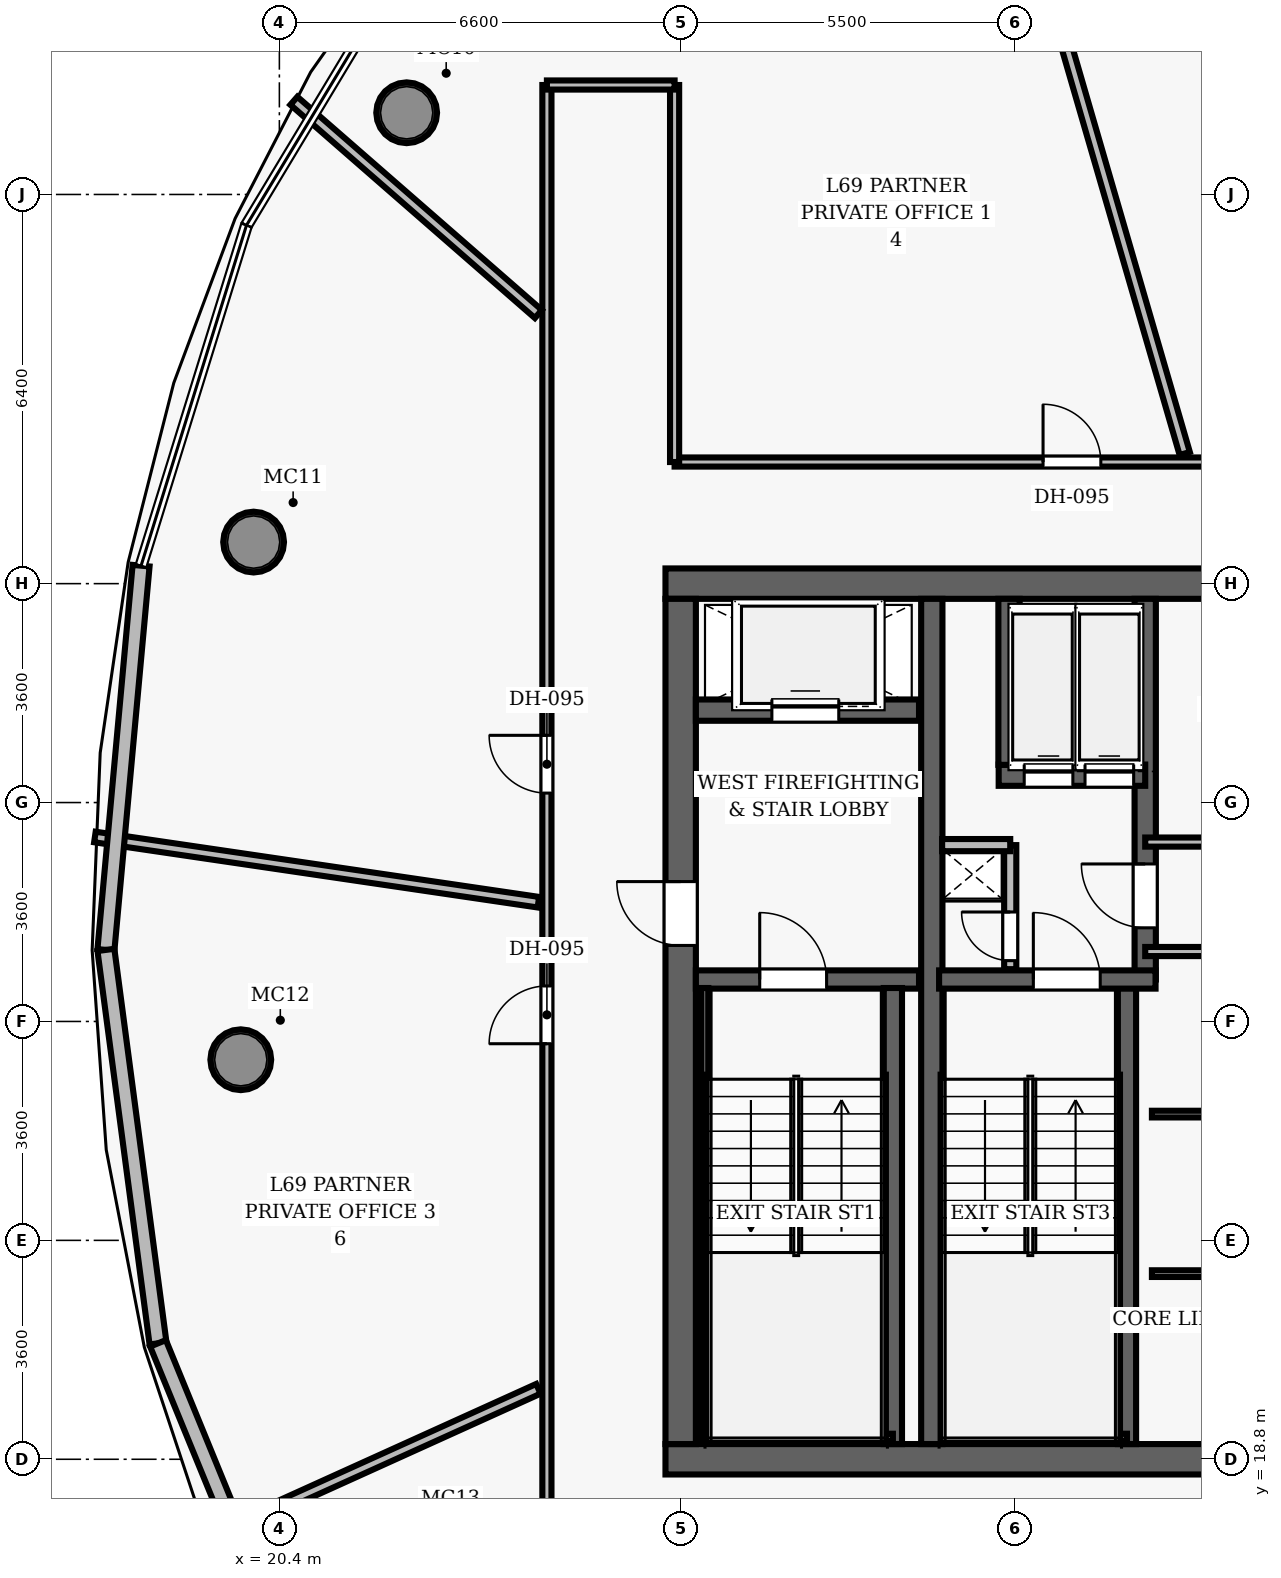
"""IFC4 building model, lengths in metres.
Left out: names, types, materials, properties, quantities, classifications, styles, units other than length and angle.
Written with IfcOpenShell. Run it as: python <this file> out.ifc"""

import sys

from ifc_helpers import new_model, si_unit, direction, frame, frame_2d, origin, origin_2d, place, context, subcontext, project, spatial, rectangle, hollow_circle, extrude, element, fill, save


model = new_model("IFC4")
c1 = context("Model", 3, precision=1e-05, world=origin(), true_north=direction((0.0, 1.0)))
c2 = subcontext(c1, "Body", "Model", "MODEL_VIEW")
j1 = project(units=[si_unit("LENGTHUNIT", "METRE"), si_unit("PLANEANGLEUNIT", "RADIAN")], contexts=[c1])
p1 = place(None, origin())
s1 = spatial("IfcSite", under=j1, at=p1, CompositionType="ELEMENT")
p2 = place(p1, origin())
s2 = spatial("IfcBuilding", under=s1, at=p2, CompositionType="ELEMENT")
p3 = place(p2, frame((0.0, 0.0, 272.85)))
s3 = spatial("IfcBuildingStorey", under=s2, at=p3, CompositionType="ELEMENT", Elevation=272.85)
p4 = place(p3, frame((26.75, 18.8, 0.0), z_axis=(0.0, 0.0, 1.0), x_axis=(1.0, 0.0, 0.0)))
e1 = element("IfcWall", 1, at=p4, inside=s3, PredefinedType="SHEAR", context=c2, shape_type="SweptSolid", body=[
    extrude(rectangle(XDim=22.5, YDim=0.5, at=frame_2d((11.25, 0.0))), origin(), (0.0, 0.0, 1.0), 3.85),
])
p5 = place(p4, frame((14.47, 0.0, 0.0)))
e2 = element("IfcOpeningElement", 2, at=p5, cuts=e1, PredefinedType="OPENING", context=c2, shape_type="SweptSolid", body=[
    extrude(rectangle(XDim=1.05, YDim=2.15, at=frame_2d((0.525, 1.075))), frame((0.0, 0.26, 0.0), z_axis=(0.0, -1.0, 0.0), x_axis=(1.0, 0.0, 0.0)), (0.0, 0.0, 1.0), 0.52),
])
p6 = place(p3, frame((26.75, 33.2, 0.0), z_axis=(0.0, 0.0, 1.0), x_axis=(1.0, 0.0, 0.0)))
e3 = element("IfcWall", 3, at=p6, inside=s3, PredefinedType="SHEAR", context=c2, shape_type="SweptSolid", body=[
    extrude(rectangle(XDim=22.5, YDim=0.5, at=frame_2d((11.25, 0.0))), origin(), (0.0, 0.0, 1.0), 3.85),
])
p7 = place(p3, frame((27.0, 19.05, 0.0), z_axis=(0.0, 0.0, 1.0), x_axis=(0.0, 1.0, 0.0)))
e4 = element("IfcWall", 4, at=p7, inside=s3, PredefinedType="SHEAR", context=c2, shape_type="SweptSolid", body=[
    extrude(rectangle(XDim=13.9, YDim=0.5, at=frame_2d((6.95, 0.0))), origin(), (0.0, 0.0, 1.0), 3.85),
])
p8 = place(p7, frame((8.2, 0.0, 0.0)))
e5 = element("IfcOpeningElement", 5, at=p8, cuts=e4, PredefinedType="OPENING", context=c2, shape_type="SweptSolid", body=[
    extrude(rectangle(XDim=1.05, YDim=2.15, at=frame_2d((0.525, 1.075))), frame((0.0, 0.26, 0.0), z_axis=(0.0, -1.0, 0.0), x_axis=(1.0, 0.0, 0.0)), (0.0, 0.0, 1.0), 0.52),
])
p9 = place(p3, frame((31.13, 19.05, 0.0), z_axis=(0.0, 0.0, 1.0), x_axis=(0.0, 1.0, 0.0)))
e6 = element("IfcWall", 6, at=p9, inside=s3, PredefinedType="SHEAR", context=c2, shape_type="SweptSolid", body=[
    extrude(rectangle(XDim=13.9, YDim=0.35, at=frame_2d((6.95, 0.0))), origin(), (0.0, 0.0, 1.0), 3.85),
])
for number, where, z_axis, x_axis in (
    (7, (22.494, 40.944, 0.0), (0.0, 0.0, 1.0), (1.0, 0.0, 0.0)),
    (8, (19.976, 33.884, 0.0), (0.0, 0.0, 1.0), (1.0, 0.0, 0.0)),
    (9, (19.765, 25.371, 0.0), (0.0, 0.0, 1.0), (1.0, 0.0, 0.0)),
):
    element("IfcColumn", number, at=place(p3, frame(where, z_axis=z_axis, x_axis=x_axis)), inside=s3, PredefinedType="COLUMN", context=c2, shape_type="SweptSolid", body=[
        extrude(hollow_circle(Radius=0.5, WallThickness=0.045, at=origin_2d()), origin(), (0.0, 0.0, 1.0), 3.85),
    ])
p10 = place(p3, frame((27.25, 26.69, 0.0), z_axis=(0.0, 0.0, 1.0), x_axis=(1.0, 0.0, 0.0)))
e10 = element("IfcWall", 10, at=p10, inside=s3, PredefinedType="SHEAR", context=c2, shape_type="SweptSolid", body=[
    extrude(rectangle(XDim=3.67, YDim=0.3, at=frame_2d((1.835, 0.0))), origin(), (0.0, 0.0, 1.0), 3.85),
])
p11 = place(p10, frame((1.05, 0.0, 0.0)))
e11 = element("IfcOpeningElement", 11, at=p11, cuts=e10, PredefinedType="OPENING", context=c2, shape_type="SweptSolid", body=[
    extrude(rectangle(XDim=1.1, YDim=2.15, at=frame_2d((0.55, 1.075))), frame((0.0, 0.16, 0.0), z_axis=(0.0, -1.0, 0.0), x_axis=(1.0, 0.0, 0.0)), (0.0, 0.0, 1.0), 0.32),
])
p12 = place(p3, frame((30.49, 19.05, 0.0), z_axis=(0.0, 0.0, 1.0), x_axis=(0.0, 1.0, 0.0)))
e12 = element("IfcWall", 12, at=p12, inside=s3, PredefinedType="SHEAR", context=c2, shape_type="SweptSolid", body=[
    extrude(rectangle(XDim=7.5, YDim=0.3, at=frame_2d((3.75, 0.0))), origin(), (0.0, 0.0, 1.0), 3.85),
])
p13 = place(p3, frame((27.395, 19.1, 0.0), z_axis=(0.0, 0.0, 1.0), x_axis=(0.0, 1.0, 0.0)))
e13 = element("IfcWall", 13, at=p13, inside=s3, PredefinedType="SHEAR", context=c2, shape_type="SweptSolid", body=[
    extrude(rectangle(XDim=7.45, YDim=0.12, at=frame_2d((3.725, 0.0))), origin(), (0.0, 0.0, 1.0), 3.85),
])
p14 = place(p3, frame((27.395, 19.16, 0.0), z_axis=(0.0, 0.0, 1.0), x_axis=(1.0, 0.0, 0.0)))
e14 = element("IfcWall", 14, at=p14, inside=s3, PredefinedType="SHEAR", context=c2, shape_type="SweptSolid", body=[
    extrude(rectangle(XDim=3.095, YDim=0.12, at=frame_2d((1.547, 0.0))), origin(), (0.0, 0.0, 1.0), 3.85),
])
p15 = place(p3, frame((27.25, 31.12, 0.0), z_axis=(0.0, 0.0, 1.0), x_axis=(1.0, 0.0, 0.0)))
e15 = element("IfcWall", 15, at=p15, inside=s3, PredefinedType="SHEAR", context=c2, shape_type="SweptSolid", body=[
    extrude(rectangle(XDim=3.67, YDim=0.35, at=frame_2d((1.835, 0.0))), origin(), (0.0, 0.0, 1.0), 3.04),
])
p16 = place(p15, frame((1.25, 0.0, 0.0)))
e16 = element("IfcOpeningElement", 16, at=p16, cuts=e15, PredefinedType="OPENING", context=c2, shape_type="SweptSolid", body=[
    extrude(rectangle(XDim=1.1, YDim=2.15, at=frame_2d((0.55, 1.075))), frame((0.0, 0.185, 0.0), z_axis=(0.0, -1.0, 0.0), x_axis=(1.0, 0.0, 0.0)), (0.0, 0.0, 1.0), 0.37),
])
p17 = place(p3, frame((34.34, 19.05, 0.0), z_axis=(0.0, 0.0, 1.0), x_axis=(0.0, 1.0, 0.0)))
e17 = element("IfcWall", 17, at=p17, inside=s3, PredefinedType="SHEAR", context=c2, shape_type="SweptSolid", body=[
    extrude(rectangle(XDim=7.5, YDim=0.3, at=frame_2d((3.75, 0.0))), origin(), (0.0, 0.0, 1.0), 3.85),
])
p18 = place(p3, frame((34.64, 26.69, 0.0), z_axis=(0.0, 0.0, 1.0), x_axis=(0.0, 1.0, 0.0)))
e18 = element("IfcWall", 18, at=p18, inside=s3, PredefinedType="SHEAR", context=c2, shape_type="SweptSolid", body=[
    extrude(rectangle(XDim=6.26, YDim=0.35, at=frame_2d((3.13, 0.0))), origin(), (0.0, 0.0, 1.0), 3.85),
])
p19 = place(p18, frame((0.85, 0.0, 0.0)))
e19 = element("IfcOpeningElement", 19, at=p19, cuts=e18, PredefinedType="OPENING", context=c2, shape_type="SweptSolid", body=[
    extrude(rectangle(XDim=1.05, YDim=2.15, at=frame_2d((0.525, 1.075))), frame((0.0, 0.185, 0.0), z_axis=(0.0, -1.0, 0.0), x_axis=(1.0, 0.0, 0.0)), (0.0, 0.0, 1.0), 0.37),
])
p20 = place(p3, frame((31.25, 26.69, 0.0), z_axis=(0.0, 0.0, 1.0), x_axis=(1.0, 0.0, 0.0)))
e20 = element("IfcWall", 20, at=p20, inside=s3, PredefinedType="SHEAR", context=c2, shape_type="SweptSolid", body=[
    extrude(rectangle(XDim=3.56, YDim=0.3, at=frame_2d((1.78, 0.0))), origin(), (0.0, 0.0, 1.0), 3.85),
])
p21 = place(p20, frame((1.55, 0.0, 0.0)))
e21 = element("IfcOpeningElement", 21, at=p21, cuts=e20, PredefinedType="OPENING", context=c2, shape_type="SweptSolid", body=[
    extrude(rectangle(XDim=1.1, YDim=2.15, at=frame_2d((0.55, 1.075))), frame((0.0, 0.16, 0.0), z_axis=(0.0, -1.0, 0.0), x_axis=(1.0, 0.0, 0.0)), (0.0, 0.0, 1.0), 0.32),
])
p22 = place(p3, frame((31.3, 19.16, 0.0), z_axis=(0.0, 0.0, 1.0), x_axis=(1.0, 0.0, 0.0)))
e22 = element("IfcWall", 22, at=p22, inside=s3, PredefinedType="SHEAR", context=c2, shape_type="SweptSolid", body=[
    extrude(rectangle(XDim=3.04, YDim=0.12, at=frame_2d((1.52, 0.0))), origin(), (0.0, 0.0, 1.0), 3.85),
])
p23 = place(p3, frame((32.23, 30.05, 0.0), z_axis=(0.0, 0.0, 1.0), x_axis=(1.0, 0.0, 0.0)))
e23 = element("IfcWall", 23, at=p23, inside=s3, PredefinedType="SHEAR", context=c2, shape_type="SweptSolid", body=[
    extrude(rectangle(XDim=2.41, YDim=0.35, at=frame_2d((1.205, 0.0))), origin(), (0.0, 0.0, 1.0), 3.04),
])
p24 = place(p23, frame((0.42, 0.0, 0.0)))
e24 = element("IfcOpeningElement", 24, at=p24, cuts=e23, PredefinedType="OPENING", context=c2, shape_type="SweptSolid", body=[
    extrude(rectangle(XDim=0.8, YDim=2.15, at=frame_2d((0.4, 1.075))), frame((0.0, 0.185, 0.0), z_axis=(0.0, -1.0, 0.0), x_axis=(1.0, 0.0, 0.0)), (0.0, 0.0, 1.0), 0.37),
])
p25 = place(p23, frame((1.42, 0.0, 0.0)))
e25 = element("IfcOpeningElement", 25, at=p25, cuts=e23, PredefinedType="OPENING", context=c2, shape_type="SweptSolid", body=[
    extrude(rectangle(XDim=0.8, YDim=2.15, at=frame_2d((0.4, 1.075))), frame((0.0, 0.185, 0.0), z_axis=(0.0, -1.0, 0.0), x_axis=(1.0, 0.0, 0.0)), (0.0, 0.0, 1.0), 0.37),
])
p26 = place(p3, frame((32.4, 30.22, 0.0), z_axis=(0.0, 0.0, 1.0), x_axis=(0.0, 1.0, 0.0)))
e26 = element("IfcWall", 26, at=p26, inside=s3, PredefinedType="SHEAR", context=c2, shape_type="SweptSolid", body=[
    extrude(rectangle(XDim=2.73, YDim=0.35, at=frame_2d((1.365, 0.0))), origin(), (0.0, 0.0, 1.0), 3.04),
])
p27 = place(p3, frame((32.42, 26.86, 0.0), z_axis=(0.0, 0.0, 1.0), x_axis=(0.0, 1.0, 0.0)))
e27 = element("IfcWall", 27, at=p27, inside=s3, PredefinedType="PARTITIONING", context=c2, shape_type="SweptSolid", body=[
    extrude(rectangle(XDim=2.04, YDim=0.2, at=frame_2d((1.02, 0.0))), origin(), (0.0, 0.0, 1.0), 3.04),
])
p28 = place(p27, frame((0.14, 0.0, 0.0)))
e28 = element("IfcOpeningElement", 28, at=p28, cuts=e27, PredefinedType="OPENING", context=c2, shape_type="SweptSolid", body=[
    extrude(rectangle(XDim=0.8, YDim=2.05, at=frame_2d((0.4, 1.025))), frame((0.0, 0.11, 0.0), z_axis=(0.0, -1.0, 0.0), x_axis=(1.0, 0.0, 0.0)), (0.0, 0.0, 1.0), 0.22),
])
p29 = place(p3, frame((31.3, 28.9, 0.0), z_axis=(0.0, 0.0, 1.0), x_axis=(1.0, 0.0, 0.0)))
e29 = element("IfcWall", 29, at=p29, inside=s3, PredefinedType="PARTITIONING", context=c2, shape_type="SweptSolid", body=[
    extrude(rectangle(XDim=1.12, YDim=0.2, at=frame_2d((0.56, 0.0))), origin(), (0.0, 0.0, 1.0), 3.04),
])
for number, where, z_axis, x_axis in (
    (30, (34.64, 27.15, 0.0), (0.0, 0.0, 1.0), (1.0, 0.0, 0.0)),
    (31, (34.64, 28.95, 0.0), (0.0, 0.0, 1.0), (1.0, 0.0, 0.0)),
):
    element("IfcWall", number, at=place(p3, frame(where, z_axis=z_axis, x_axis=x_axis)), inside=s3, PredefinedType="PARTITIONING", context=c2, shape_type="SweptSolid", body=[
        extrude(rectangle(XDim=6.36, YDim=0.15, at=frame_2d((3.18, 0.0))), origin(), (0.0, 0.0, 1.0), 3.04),
    ])
for number, where, z_axis, x_axis in (
    (32, (34.75, 21.853, 0.0), (0.0, 0.0, 1.0), (1.0, 0.0, 0.0)),
    (33, (34.75, 24.477, 0.0), (0.0, 0.0, 1.0), (1.0, 0.0, 0.0)),
):
    element("IfcWall", number, at=place(p3, frame(where, z_axis=z_axis, x_axis=x_axis)), inside=s3, PredefinedType="PARTITIONING", context=c2, shape_type="SweptSolid", body=[
        extrude(rectangle(XDim=6.25, YDim=0.11, at=frame_2d((3.125, 0.0))), origin(), (0.0, 0.0, 1.0), 3.04),
    ])
p30 = place(p3, frame((26.9, 35.2, 0.0), z_axis=(0.0, 0.0, 1.0), x_axis=(1.0, 0.0, 0.0)))
e34 = element("IfcWall", 34, at=p30, inside=s3, PredefinedType="PARTITIONING", context=c2, shape_type="SweptSolid", body=[
    extrude(rectangle(XDim=10.05, YDim=0.15, at=frame_2d((5.025, 0.0))), origin(), (0.0, 0.0, 1.0), 3.04),
])
p31 = place(p30, frame((6.06, 0.0, 0.0)))
e35 = element("IfcOpeningElement", 35, at=p31, cuts=e34, PredefinedType="OPENING", context=c2, shape_type="SweptSolid", body=[
    extrude(rectangle(XDim=0.95, YDim=2.15, at=frame_2d((0.475, 1.075))), frame((0.0, 0.085, 0.0), z_axis=(0.0, -1.0, 0.0), x_axis=(1.0, 0.0, 0.0)), (0.0, 0.0, 1.0), 0.17),
])
p32 = place(p3, frame((24.8, 10.6, 0.0), z_axis=(0.0, 0.0, 1.0), x_axis=(0.0, 1.0, 0.0)))
e36 = element("IfcWall", 36, at=p32, inside=s3, PredefinedType="PARTITIONING", context=c2, shape_type="SweptSolid", body=[
    extrude(rectangle(XDim=30.8, YDim=0.15, at=frame_2d((15.4, 0.0))), origin(), (0.0, 0.0, 1.0), 3.04),
])
p33 = place(p32, frame((19.156, 0.0, 0.0)))
e37 = element("IfcOpeningElement", 37, at=p33, cuts=e36, PredefinedType="OPENING", context=c2, shape_type="SweptSolid", body=[
    extrude(rectangle(XDim=0.95, YDim=2.15, at=frame_2d((0.475, 1.075))), frame((0.0, 0.085, 0.0), z_axis=(0.0, -1.0, 0.0), x_axis=(1.0, 0.0, 0.0)), (0.0, 0.0, 1.0), 0.17),
])
p34 = place(p32, frame((15.034, 0.0, 0.0)))
e38 = element("IfcOpeningElement", 38, at=p34, cuts=e36, PredefinedType="OPENING", context=c2, shape_type="SweptSolid", body=[
    extrude(rectangle(XDim=0.95, YDim=2.15, at=frame_2d((0.475, 1.075))), frame((0.0, 0.085, 0.0), z_axis=(0.0, -1.0, 0.0), x_axis=(1.0, 0.0, 0.0)), (0.0, 0.0, 1.0), 0.17),
])
p35 = place(p32, frame((1.941, 0.0, 0.0)))
e39 = element("IfcOpeningElement", 39, at=p35, cuts=e36, PredefinedType="OPENING", context=c2, shape_type="SweptSolid", body=[
    extrude(rectangle(XDim=0.95, YDim=2.15, at=frame_2d((0.475, 1.075))), frame((0.0, 0.085, 0.0), z_axis=(0.0, -1.0, 0.0), x_axis=(1.0, 0.0, 0.0)), (0.0, 0.0, 1.0), 0.17),
])
p36 = place(p3, frame((26.9, 35.2, 0.0), z_axis=(0.0, 0.0, 1.0), x_axis=(0.0, 1.0, 0.0)))
e40 = element("IfcWall", 40, at=p36, inside=s3, PredefinedType="PARTITIONING", context=c2, shape_type="SweptSolid", body=[
    extrude(rectangle(XDim=6.2, YDim=0.15, at=frame_2d((3.1, 0.0))), origin(), (0.0, 0.0, 1.0), 3.04),
])
p37 = place(p3, frame((24.8, 41.4, 0.0), z_axis=(0.0, 0.0, 1.0), x_axis=(1.0, 0.0, 0.0)))
e41 = element("IfcWall", 41, at=p37, inside=s3, PredefinedType="PARTITIONING", context=c2, shape_type="SweptSolid", body=[
    extrude(rectangle(XDim=2.1, YDim=0.15, at=frame_2d((1.05, 0.0))), origin(), (0.0, 0.0, 1.0), 3.04),
])
p38 = place(p3, frame((35.29, 35.34, 0.0), z_axis=(0.0, 0.0, 1.0), x_axis=(-0.278700213972, 0.960378149862, 0.0)))
e42 = element("IfcWall", 42, at=p38, inside=s3, PredefinedType="PARTITIONING", context=c2, shape_type="SweptSolid", body=[
    extrude(rectangle(XDim=13.671, YDim=0.175, at=frame_2d((6.835, 0.0))), origin(), (0.0, 0.0, 1.0), 3.04),
])
p39 = place(p3, frame((24.66, 37.634, 0.0), z_axis=(0.0, 0.0, 1.0), x_axis=(-0.753664051115, 0.657259840594, 0.0)))
e43 = element("IfcWall", 43, at=p39, inside=s3, PredefinedType="PARTITIONING", context=c2, shape_type="SweptSolid", body=[
    extrude(rectangle(XDim=5.336, YDim=0.175, at=frame_2d((2.668, 0.0))), origin(), (0.0, 0.0, 1.0), 3.04),
])
p40 = place(p3, frame((24.66, 27.961, 0.0), z_axis=(0.0, 0.0, 1.0), x_axis=(-0.989360957967, 0.145481596263, 0.0)))
e44 = element("IfcWall", 44, at=p40, inside=s3, PredefinedType="PARTITIONING", context=c2, shape_type="SweptSolid", body=[
    extrude(rectangle(XDim=7.372, YDim=0.175, at=frame_2d((3.686, 0.0))), origin(), (0.0, 0.0, 1.0), 3.04),
])
p41 = place(p3, frame((24.66, 19.959, 0.0), z_axis=(0.0, 0.0, 1.0), x_axis=(-0.910936871774, -0.412545773997, 0.0)))
e45 = element("IfcWall", 45, at=p41, inside=s3, PredefinedType="PARTITIONING", context=c2, shape_type="SweptSolid", body=[
    extrude(rectangle(XDim=6.001, YDim=0.175, at=frame_2d((3.0, 0.0))), origin(), (0.0, 0.0, 1.0), 3.04),
])
p42 = place(p3, frame((17.547, 27.177, 0.0), z_axis=(0.0, 0.0, 1.0), x_axis=(0.091149768789, 0.995837195354, 0.0)))
e46 = element("IfcWall", 46, at=p42, inside=s3, PredefinedType="SOLIDWALL", context=c2, shape_type="SweptSolid", body=[
    extrude(rectangle(XDim=6.345, YDim=0.28, at=frame_2d((3.173, 0.0))), origin(), (0.0, 0.0, 1.0), 3.625),
])
p43 = place(p3, frame((18.404, 20.707, 0.0), z_axis=(0.0, 0.0, 1.0), x_axis=(-0.131269273367, 0.991346749563, 0.0)))
e47 = element("IfcWall", 47, at=p43, inside=s3, PredefinedType="SOLIDWALL", context=c2, shape_type="SweptSolid", body=[
    extrude(rectangle(XDim=6.526, YDim=0.28, at=frame_2d((3.263, 0.0))), origin(), (0.0, 0.0, 1.0), 3.625),
])
p44 = place(p3, frame((20.877, 14.667, 0.0), z_axis=(0.0, 0.0, 1.0), x_axis=(-0.378956165917, 0.925414622919, 0.0)))
e48 = element("IfcWall", 48, at=p44, inside=s3, PredefinedType="SOLIDWALL", context=c2, shape_type="SweptSolid", body=[
    extrude(rectangle(XDim=6.527, YDim=0.28, at=frame_2d((3.263, 0.0))), origin(), (0.0, 0.0, 1.0), 3.625),
])
p45 = place(p11, origin())
e49 = element("IfcDoor", 49, at=p45, inside=s3, OperationType="SINGLE_SWING_LEFT", PredefinedType="DOOR", context=c2, shape_type="SweptSolid", body=[
    extrude(rectangle(XDim=1.1, YDim=2.15, at=frame_2d((0.55, 1.075))), frame((0.0, 0.025, 0.0), z_axis=(0.0, -1.0, 0.0), x_axis=(1.0, 0.0, 0.0)), (0.0, 0.0, 1.0), 0.05),
])
fill(e11, e49)
p46 = place(p8, origin())
e50 = element("IfcDoor", 50, at=p46, inside=s3, OperationType="SINGLE_SWING_RIGHT", PredefinedType="DOOR", context=c2, shape_type="SweptSolid", body=[
    extrude(rectangle(XDim=1.05, YDim=2.15, at=frame_2d((0.525, 1.075))), frame((0.0, 0.025, 0.0), z_axis=(0.0, -1.0, 0.0), x_axis=(1.0, 0.0, 0.0)), (0.0, 0.0, 1.0), 0.05),
])
fill(e5, e50)
p47 = place(p21, origin())
e51 = element("IfcDoor", 51, at=p47, inside=s3, OperationType="SINGLE_SWING_LEFT", PredefinedType="DOOR", context=c2, shape_type="SweptSolid", body=[
    extrude(rectangle(XDim=1.1, YDim=2.15, at=frame_2d((0.55, 1.075))), frame((0.0, 0.025, 0.0), z_axis=(0.0, -1.0, 0.0), x_axis=(1.0, 0.0, 0.0)), (0.0, 0.0, 1.0), 0.05),
])
fill(e21, e51)
p48 = place(p28, origin())
e52 = element("IfcDoor", 52, at=p48, inside=s3, OperationType="SINGLE_SWING_RIGHT", PredefinedType="DOOR", context=c2, shape_type="SweptSolid", body=[
    extrude(rectangle(XDim=0.8, YDim=2.05, at=frame_2d((0.4, 1.025))), frame((0.0, 0.025, 0.0), z_axis=(0.0, -1.0, 0.0), x_axis=(1.0, 0.0, 0.0)), (0.0, 0.0, 1.0), 0.05),
])
fill(e28, e52)
p49 = place(p19, origin())
e53 = element("IfcDoor", 53, at=p49, inside=s3, OperationType="SINGLE_SWING_RIGHT", PredefinedType="DOOR", context=c2, shape_type="SweptSolid", body=[
    extrude(rectangle(XDim=1.05, YDim=2.15, at=frame_2d((0.525, 1.075))), frame((0.0, 0.025, 0.0), z_axis=(0.0, -1.0, 0.0), x_axis=(1.0, 0.0, 0.0)), (0.0, 0.0, 1.0), 0.05),
])
fill(e19, e53)
p50 = place(p31, origin())
e54 = element("IfcDoor", 54, at=p50, inside=s3, OperationType="SINGLE_SWING_LEFT", PredefinedType="DOOR", context=c2, shape_type="SweptSolid", body=[
    extrude(rectangle(XDim=0.95, YDim=2.15, at=frame_2d((0.475, 1.075))), frame((0.0, 0.025, 0.0), z_axis=(0.0, -1.0, 0.0), x_axis=(1.0, 0.0, 0.0)), (0.0, 0.0, 1.0), 0.05),
])
fill(e35, e54)
p51 = place(p33, origin())
e55 = element("IfcDoor", 55, at=p51, inside=s3, OperationType="SINGLE_SWING_RIGHT", PredefinedType="DOOR", context=c2, shape_type="SweptSolid", body=[
    extrude(rectangle(XDim=0.95, YDim=2.15, at=frame_2d((0.475, 1.075))), frame((0.0, 0.025, 0.0), z_axis=(0.0, -1.0, 0.0), x_axis=(1.0, 0.0, 0.0)), (0.0, 0.0, 1.0), 0.05),
])
fill(e37, e55)
p52 = place(p34, origin())
e56 = element("IfcDoor", 56, at=p52, inside=s3, OperationType="SINGLE_SWING_LEFT", PredefinedType="DOOR", context=c2, shape_type="SweptSolid", body=[
    extrude(rectangle(XDim=0.95, YDim=2.15, at=frame_2d((0.475, 1.075))), frame((0.0, 0.025, 0.0), z_axis=(0.0, -1.0, 0.0), x_axis=(1.0, 0.0, 0.0)), (0.0, 0.0, 1.0), 0.05),
])
fill(e38, e56)
p53 = place(p16, origin())
e57 = element("IfcDoor", 57, at=p53, inside=s3, OperationType="SLIDING_TO_LEFT", PredefinedType="DOOR", context=c2, shape_type="SweptSolid", body=[
    extrude(rectangle(XDim=1.1, YDim=2.15, at=frame_2d((0.55, 1.075))), frame((0.0, 0.025, 0.0), z_axis=(0.0, -1.0, 0.0), x_axis=(1.0, 0.0, 0.0)), (0.0, 0.0, 1.0), 0.05),
])
fill(e16, e57)
p54 = place(p24, origin())
e58 = element("IfcDoor", 58, at=p54, inside=s3, OperationType="SLIDING_TO_LEFT", PredefinedType="DOOR", context=c2, shape_type="SweptSolid", body=[
    extrude(rectangle(XDim=0.8, YDim=2.15, at=frame_2d((0.4, 1.075))), frame((0.0, 0.025, 0.0), z_axis=(0.0, -1.0, 0.0), x_axis=(1.0, 0.0, 0.0)), (0.0, 0.0, 1.0), 0.05),
])
fill(e24, e58)
p55 = place(p25, origin())
e59 = element("IfcDoor", 59, at=p55, inside=s3, OperationType="SLIDING_TO_LEFT", PredefinedType="DOOR", context=c2, shape_type="SweptSolid", body=[
    extrude(rectangle(XDim=0.8, YDim=2.15, at=frame_2d((0.4, 1.075))), frame((0.0, 0.025, 0.0), z_axis=(0.0, -1.0, 0.0), x_axis=(1.0, 0.0, 0.0)), (0.0, 0.0, 1.0), 0.05),
])
fill(e25, e59)
save(model, sys.argv[1])
